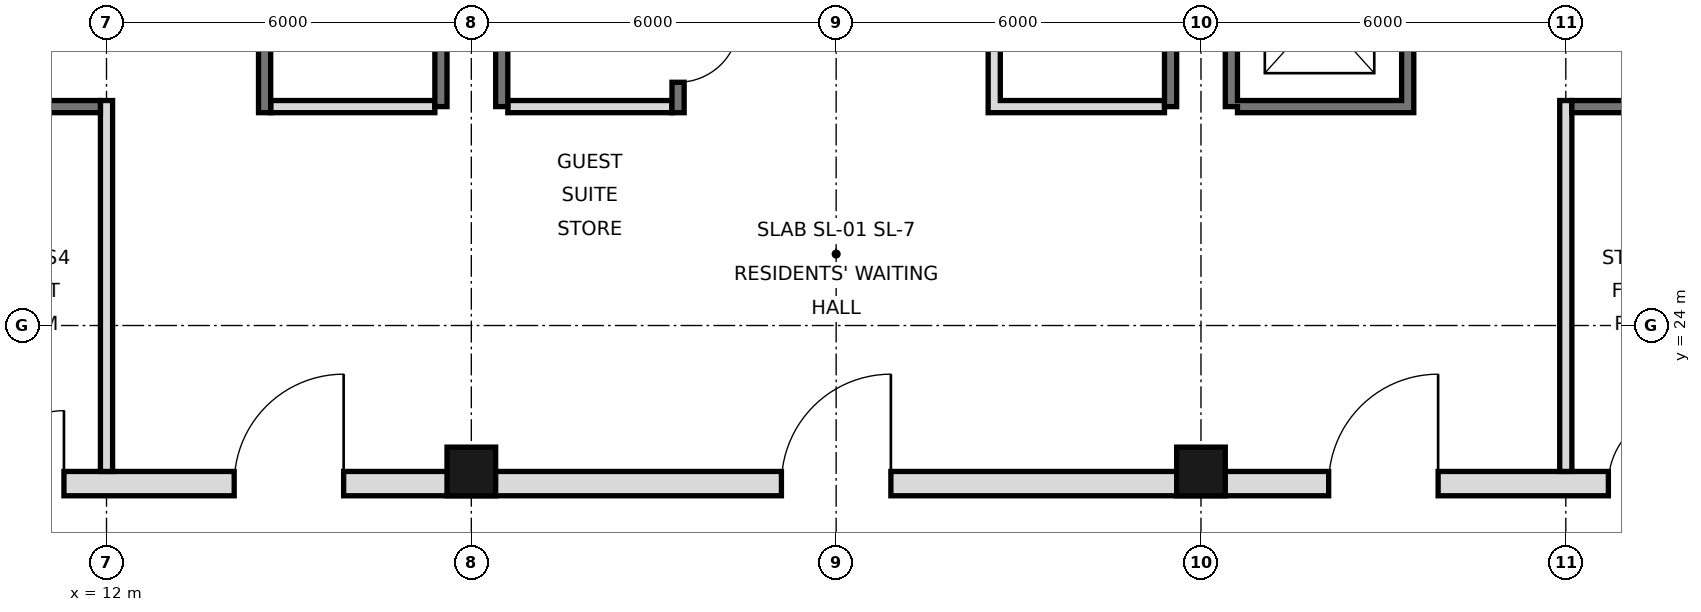
"""IFC4 building model, lengths in metres.
Left out: names, types, materials, properties, quantities, classifications, styles, units other than length and angle.
Written with IfcOpenShell. Run it as: python <this file> out.ifc"""

import sys

from ifc_helpers import new_model, si_unit, direction, frame, frame_2d, origin, origin_2d, place, context, subcontext, project, spatial, rectangle, hollow_rectangle, extrude, element, fill, save


model = new_model("IFC4")
c1 = context("Model", 3, precision=1e-05, world=origin(), true_north=direction((0.0, 1.0)))
c2 = subcontext(c1, "Body", "Model", "MODEL_VIEW")
j1 = project(units=[si_unit("LENGTHUNIT", "METRE"), si_unit("PLANEANGLEUNIT", "RADIAN")], contexts=[c1])
p1 = place(None, origin())
s1 = spatial("IfcSite", under=j1, at=p1, CompositionType="ELEMENT")
p2 = place(p1, origin())
s2 = spatial("IfcBuilding", under=s1, at=p2, CompositionType="ELEMENT")
p3 = place(p2, frame((0.0, 0.0, 222.6)))
s3 = spatial("IfcBuildingStorey", under=s2, at=p3, CompositionType="ELEMENT", Elevation=222.6)
for number, where, z_axis, x_axis in (
    (1, (18.0, 21.6, 0.0), (0.0, 0.0, 1.0), (1.0, 0.0, 0.0)),
    (2, (30.0, 21.6, 0.0), (0.0, 0.0, 1.0), (1.0, 0.0, 0.0)),
):
    element("IfcColumn", number, at=place(p3, frame(where, z_axis=z_axis, x_axis=x_axis)), inside=s3, PredefinedType="COLUMN", context=c2, shape_type="SweptSolid", body=[
        extrude(hollow_rectangle(XDim=0.8, YDim=0.8, WallThickness=0.04, at=origin_2d()), origin(), (0.0, 0.0, 1.0), 3.6),
    ])
for number, where, z_axis, x_axis in (
    (3, (17.5, 27.6, 0.0), (0.0, 0.0, 1.0), (0.0, 1.0, 0.0)),
    (4, (18.5, 27.6, 0.0), (0.0, 0.0, 1.0), (0.0, 1.0, 0.0)),
    (5, (29.5, 27.6, 0.0), (0.0, 0.0, 1.0), (0.0, 1.0, 0.0)),
    (6, (30.5, 27.6, 0.0), (0.0, 0.0, 1.0), (0.0, 1.0, 0.0)),
):
    element("IfcWall", number, at=place(p3, frame(where, z_axis=z_axis, x_axis=x_axis)), inside=s3, PredefinedType="SOLIDWALL", context=c2, shape_type="SweptSolid", body=[
        extrude(rectangle(XDim=17.5, YDim=0.2, at=frame_2d((8.75, 0.0))), origin(), (0.0, 0.0, 1.0), 3.42),
    ])
p4 = place(p3, frame((5.6, 21.4, 0.0), z_axis=(0.0, 0.0, 1.0), x_axis=(1.0, 0.0, 0.0)))
e7 = element("IfcWall", 7, at=p4, inside=s3, PredefinedType="SOLIDWALL", context=c2, shape_type="SweptSolid", body=[
    extrude(rectangle(XDim=36.8, YDim=0.4, at=frame_2d((18.4, 0.0))), origin(), (0.0, 0.0, 1.0), 3.42),
])
p5 = place(p4, frame((8.5, 0.0, 0.0)))
e8 = element("IfcOpeningElement", 8, at=p5, cuts=e7, PredefinedType="OPENING", context=c2, shape_type="SweptSolid", body=[
    extrude(rectangle(XDim=1.8, YDim=2.1, at=frame_2d((0.9, 1.05))), frame((0.0, 0.21, 0.0), z_axis=(0.0, -1.0, 0.0), x_axis=(1.0, 0.0, 0.0)), (0.0, 0.0, 1.0), 0.42),
])
p6 = place(p4, frame((17.5, 0.0, 0.0)))
e9 = element("IfcOpeningElement", 9, at=p6, cuts=e7, PredefinedType="OPENING", context=c2, shape_type="SweptSolid", body=[
    extrude(rectangle(XDim=1.8, YDim=2.1, at=frame_2d((0.9, 1.05))), frame((0.0, 0.21, 0.0), z_axis=(0.0, -1.0, 0.0), x_axis=(1.0, 0.0, 0.0)), (0.0, 0.0, 1.0), 0.42),
])
p7 = place(p4, frame((26.5, 0.0, 0.0)))
e10 = element("IfcOpeningElement", 10, at=p7, cuts=e7, PredefinedType="OPENING", context=c2, shape_type="SweptSolid", body=[
    extrude(rectangle(XDim=1.8, YDim=2.1, at=frame_2d((0.9, 1.05))), frame((0.0, 0.21, 0.0), z_axis=(0.0, -1.0, 0.0), x_axis=(1.0, 0.0, 0.0)), (0.0, 0.0, 1.0), 0.42),
])
p8 = place(p4, frame((4.5, 0.0, 0.0)))
e11 = element("IfcOpeningElement", 11, at=p8, cuts=e7, PredefinedType="OPENING", context=c2, shape_type="SweptSolid", body=[
    extrude(rectangle(XDim=1.2, YDim=2.1, at=frame_2d((0.6, 1.05))), frame((0.0, 0.21, 0.0), z_axis=(0.0, -1.0, 0.0), x_axis=(1.0, 0.0, 0.0)), (0.0, 0.0, 1.0), 0.42),
])
p9 = place(p4, frame((31.1, 0.0, 0.0)))
e12 = element("IfcOpeningElement", 12, at=p9, cuts=e7, PredefinedType="OPENING", context=c2, shape_type="SweptSolid", body=[
    extrude(rectangle(XDim=1.2, YDim=2.1, at=frame_2d((0.6, 1.05))), frame((0.0, 0.21, 0.0), z_axis=(0.0, -1.0, 0.0), x_axis=(1.0, 0.0, 0.0)), (0.0, 0.0, 1.0), 0.42),
])
p10 = place(p3, frame((12.0, 21.6, 0.0), z_axis=(0.0, 0.0, 1.0), x_axis=(0.0, 1.0, 0.0)))
e13 = element("IfcWall", 13, at=p10, inside=s3, PredefinedType="PARTITIONING", context=c2, shape_type="SweptSolid", body=[
    extrude(rectangle(XDim=6.1, YDim=0.2, at=frame_2d((3.05, 0.0))), origin(), (0.0, 0.0, 1.0), 3.42),
])
p11 = place(p3, frame((14.6, 27.5, 0.0), z_axis=(0.0, 0.0, 1.0), x_axis=(0.0, 1.0, 0.0)))
e14 = element("IfcWall", 14, at=p11, inside=s3, PredefinedType="SOLIDWALL", context=c2, shape_type="SweptSolid", body=[
    extrude(rectangle(XDim=17.5, YDim=0.2, at=frame_2d((8.75, 0.0))), origin(), (0.0, 0.0, 1.0), 3.42),
])
p12 = place(p11, frame((15.4, 0.0, 0.0)))
e15 = element("IfcOpeningElement", 15, at=p12, cuts=e14, PredefinedType="OPENING", context=c2, shape_type="SweptSolid", body=[
    extrude(rectangle(XDim=1.1, YDim=2.1, at=frame_2d((0.55, 1.05))), frame((0.0, 0.11, 0.0), z_axis=(0.0, -1.0, 0.0), x_axis=(1.0, 0.0, 0.0)), (0.0, 0.0, 1.0), 0.22),
])
p13 = place(p11, frame((2.7, 0.0, 0.0)))
e16 = element("IfcOpeningElement", 16, at=p13, cuts=e14, PredefinedType="OPENING", context=c2, shape_type="SweptSolid", body=[
    extrude(rectangle(XDim=1.0, YDim=2.1, at=frame_2d((0.5, 1.05))), frame((0.0, 0.11, 0.0), z_axis=(0.0, -1.0, 0.0), x_axis=(1.0, 0.0, 0.0)), (0.0, 0.0, 1.0), 0.22),
])
p14 = place(p11, frame((9.9, 0.0, 0.0)))
e17 = element("IfcOpeningElement", 17, at=p14, cuts=e14, PredefinedType="OPENING", context=c2, shape_type="SweptSolid", body=[
    extrude(rectangle(XDim=0.9, YDim=2.1, at=frame_2d((0.45, 1.05))), frame((0.0, 0.11, 0.0), z_axis=(0.0, -1.0, 0.0), x_axis=(1.0, 0.0, 0.0)), (0.0, 0.0, 1.0), 0.22),
])
p15 = place(p3, frame((21.4, 27.5, 0.0), z_axis=(0.0, 0.0, 1.0), x_axis=(0.0, 1.0, 0.0)))
e18 = element("IfcWall", 18, at=p15, inside=s3, PredefinedType="SOLIDWALL", context=c2, shape_type="SweptSolid", body=[
    extrude(rectangle(XDim=17.5, YDim=0.2, at=frame_2d((8.75, 0.0))), origin(), (0.0, 0.0, 1.0), 3.42),
])
p16 = place(p15, frame((0.5, 0.0, 0.0)))
e19 = element("IfcOpeningElement", 19, at=p16, cuts=e18, PredefinedType="OPENING", context=c2, shape_type="SweptSolid", body=[
    extrude(rectangle(XDim=1.0, YDim=2.1, at=frame_2d((0.5, 1.05))), frame((0.0, 0.11, 0.0), z_axis=(0.0, -1.0, 0.0), x_axis=(1.0, 0.0, 0.0)), (0.0, 0.0, 1.0), 0.22),
])
p17 = place(p15, frame((3.6, 0.0, 0.0)))
e20 = element("IfcOpeningElement", 20, at=p17, cuts=e18, PredefinedType="OPENING", context=c2, shape_type="SweptSolid", body=[
    extrude(rectangle(XDim=1.0, YDim=2.1, at=frame_2d((0.5, 1.05))), frame((0.0, 0.11, 0.0), z_axis=(0.0, -1.0, 0.0), x_axis=(1.0, 0.0, 0.0)), (0.0, 0.0, 1.0), 0.22),
])
p18 = place(p15, frame((16.2, 0.0, 0.0)))
e21 = element("IfcOpeningElement", 21, at=p18, cuts=e18, PredefinedType="OPENING", context=c2, shape_type="SweptSolid", body=[
    extrude(rectangle(XDim=1.0, YDim=2.1, at=frame_2d((0.5, 1.05))), frame((0.0, 0.11, 0.0), z_axis=(0.0, -1.0, 0.0), x_axis=(1.0, 0.0, 0.0)), (0.0, 0.0, 1.0), 0.22),
])
p19 = place(p15, frame((7.4, 0.0, 0.0)))
e22 = element("IfcOpeningElement", 22, at=p19, cuts=e18, PredefinedType="OPENING", context=c2, shape_type="SweptSolid", body=[
    extrude(rectangle(XDim=0.9, YDim=2.1, at=frame_2d((0.45, 1.05))), frame((0.0, 0.11, 0.0), z_axis=(0.0, -1.0, 0.0), x_axis=(1.0, 0.0, 0.0)), (0.0, 0.0, 1.0), 0.22),
])
p20 = place(p3, frame((26.6, 27.5, 0.0), z_axis=(0.0, 0.0, 1.0), x_axis=(0.0, 1.0, 0.0)))
e23 = element("IfcWall", 23, at=p20, inside=s3, PredefinedType="SOLIDWALL", context=c2, shape_type="SweptSolid", body=[
    extrude(rectangle(XDim=17.5, YDim=0.2, at=frame_2d((8.75, 0.0))), origin(), (0.0, 0.0, 1.0), 3.42),
])
p21 = place(p20, frame((4.3, 0.0, 0.0)))
e24 = element("IfcOpeningElement", 24, at=p21, cuts=e23, PredefinedType="OPENING", context=c2, shape_type="SweptSolid", body=[
    extrude(rectangle(XDim=0.9, YDim=2.1, at=frame_2d((0.45, 1.05))), frame((0.0, 0.11, 0.0), z_axis=(0.0, -1.0, 0.0), x_axis=(1.0, 0.0, 0.0)), (0.0, 0.0, 1.0), 0.22),
])
p22 = place(p20, frame((10.35, 0.0, 0.0)))
e25 = element("IfcOpeningElement", 25, at=p22, cuts=e23, PredefinedType="OPENING", context=c2, shape_type="SweptSolid", body=[
    extrude(rectangle(XDim=1.0, YDim=2.1, at=frame_2d((0.5, 1.05))), frame((0.0, 0.11, 0.0), z_axis=(0.0, -1.0, 0.0), x_axis=(1.0, 0.0, 0.0)), (0.0, 0.0, 1.0), 0.22),
])
p23 = place(p20, frame((14.575, 0.0, 0.0)))
e26 = element("IfcOpeningElement", 26, at=p23, cuts=e23, PredefinedType="OPENING", context=c2, shape_type="SweptSolid", body=[
    extrude(rectangle(XDim=1.0, YDim=2.1, at=frame_2d((0.5, 1.05))), frame((0.0, 0.11, 0.0), z_axis=(0.0, -1.0, 0.0), x_axis=(1.0, 0.0, 0.0)), (0.0, 0.0, 1.0), 0.22),
])
p24 = place(p3, frame((33.4, 27.5, 0.0), z_axis=(0.0, 0.0, 1.0), x_axis=(0.0, 1.0, 0.0)))
e27 = element("IfcWall", 27, at=p24, inside=s3, PredefinedType="SOLIDWALL", context=c2, shape_type="SweptSolid", body=[
    extrude(rectangle(XDim=17.5, YDim=0.2, at=frame_2d((8.75, 0.0))), origin(), (0.0, 0.0, 1.0), 3.42),
])
p25 = place(p24, frame((1.1, 0.0, 0.0)))
e28 = element("IfcOpeningElement", 28, at=p25, cuts=e27, PredefinedType="OPENING", context=c2, shape_type="SweptSolid", body=[
    extrude(rectangle(XDim=1.1, YDim=2.1, at=frame_2d((0.55, 1.05))), frame((0.0, 0.11, 0.0), z_axis=(0.0, -1.0, 0.0), x_axis=(1.0, 0.0, 0.0)), (0.0, 0.0, 1.0), 0.22),
])
p26 = place(p24, frame((4.2, 0.0, 0.0)))
e29 = element("IfcOpeningElement", 29, at=p26, cuts=e27, PredefinedType="OPENING", context=c2, shape_type="SweptSolid", body=[
    extrude(rectangle(XDim=1.1, YDim=2.1, at=frame_2d((0.55, 1.05))), frame((0.0, 0.11, 0.0), z_axis=(0.0, -1.0, 0.0), x_axis=(1.0, 0.0, 0.0)), (0.0, 0.0, 1.0), 0.22),
])
p27 = place(p24, frame((15.4, 0.0, 0.0)))
e30 = element("IfcOpeningElement", 30, at=p27, cuts=e27, PredefinedType="OPENING", context=c2, shape_type="SweptSolid", body=[
    extrude(rectangle(XDim=1.1, YDim=2.1, at=frame_2d((0.55, 1.05))), frame((0.0, 0.11, 0.0), z_axis=(0.0, -1.0, 0.0), x_axis=(1.0, 0.0, 0.0)), (0.0, 0.0, 1.0), 0.22),
])
p28 = place(p24, frame((9.9, 0.0, 0.0)))
e31 = element("IfcOpeningElement", 31, at=p28, cuts=e27, PredefinedType="OPENING", context=c2, shape_type="SweptSolid", body=[
    extrude(rectangle(XDim=0.9, YDim=2.1, at=frame_2d((0.45, 1.05))), frame((0.0, 0.11, 0.0), z_axis=(0.0, -1.0, 0.0), x_axis=(1.0, 0.0, 0.0)), (0.0, 0.0, 1.0), 0.22),
])
p29 = place(p3, frame((36.0, 21.6, 0.0), z_axis=(0.0, 0.0, 1.0), x_axis=(0.0, 1.0, 0.0)))
e32 = element("IfcWall", 32, at=p29, inside=s3, PredefinedType="PARTITIONING", context=c2, shape_type="SweptSolid", body=[
    extrude(rectangle(XDim=6.1, YDim=0.2, at=frame_2d((3.05, 0.0))), origin(), (0.0, 0.0, 1.0), 3.42),
])
for number, where, z_axis, x_axis in (
    (33, (14.7, 27.6, 0.0), (0.0, 0.0, 1.0), (1.0, 0.0, 0.0)),
    (34, (18.6, 27.6, 0.0), (0.0, 0.0, 1.0), (1.0, 0.0, 0.0)),
):
    element("IfcWall", number, at=place(p3, frame(where, z_axis=z_axis, x_axis=x_axis)), inside=s3, PredefinedType="PARTITIONING", context=c2, shape_type="SweptSolid", body=[
        extrude(rectangle(XDim=2.7, YDim=0.2, at=frame_2d((1.35, 0.0))), origin(), (0.0, 0.0, 1.0), 3.42),
    ])
for number, where, z_axis, x_axis in (
    (35, (26.7, 27.6, 0.0), (0.0, 0.0, 1.0), (1.0, 0.0, 0.0)),
    (36, (30.6, 27.6, 0.0), (0.0, 0.0, 1.0), (1.0, 0.0, 0.0)),
):
    element("IfcWall", number, at=place(p3, frame(where, z_axis=z_axis, x_axis=x_axis)), inside=s3, PredefinedType="SOLIDWALL", context=c2, shape_type="SweptSolid", body=[
        extrude(rectangle(XDim=2.7, YDim=0.2, at=frame_2d((1.35, 0.0))), origin(), (0.0, 0.0, 1.0), 3.42),
    ])
for number, where, z_axis, x_axis in (
    (37, (36.1, 27.6, 0.0), (0.0, 0.0, 1.0), (1.0, 0.0, 0.0)),
    (38, (6.6, 27.6, 0.0), (0.0, 0.0, 1.0), (1.0, 0.0, 0.0)),
):
    element("IfcWall", number, at=place(p3, frame(where, z_axis=z_axis, x_axis=x_axis)), inside=s3, PredefinedType="SOLIDWALL", context=c2, shape_type="SweptSolid", body=[
        extrude(rectangle(XDim=5.3, YDim=0.2, at=frame_2d((2.65, 0.0))), origin(), (0.0, 0.0, 1.0), 3.42),
    ])
p30 = place(p5, frame((1.8, 0.0, 0.0), z_axis=(0.0, 0.0, 1.0), x_axis=(-1.0, 0.0, 0.0)))
e39 = element("IfcDoor", 39, at=p30, inside=s3, OperationType="SINGLE_SWING_LEFT", PredefinedType="DOOR", context=c2, shape_type="SweptSolid", body=[
    extrude(rectangle(XDim=1.8, YDim=2.1, at=frame_2d((0.9, 1.05))), frame((0.0, 0.025, 0.0), z_axis=(0.0, -1.0, 0.0), x_axis=(1.0, 0.0, 0.0)), (0.0, 0.0, 1.0), 0.05),
])
fill(e8, e39)
p31 = place(p6, frame((1.8, 0.0, 0.0), z_axis=(0.0, 0.0, 1.0), x_axis=(-1.0, 0.0, 0.0)))
e40 = element("IfcDoor", 40, at=p31, inside=s3, OperationType="SINGLE_SWING_LEFT", PredefinedType="DOOR", context=c2, shape_type="SweptSolid", body=[
    extrude(rectangle(XDim=1.8, YDim=2.1, at=frame_2d((0.9, 1.05))), frame((0.0, 0.025, 0.0), z_axis=(0.0, -1.0, 0.0), x_axis=(1.0, 0.0, 0.0)), (0.0, 0.0, 1.0), 0.05),
])
fill(e9, e40)
p32 = place(p7, frame((1.8, 0.0, 0.0), z_axis=(0.0, 0.0, 1.0), x_axis=(-1.0, 0.0, 0.0)))
e41 = element("IfcDoor", 41, at=p32, inside=s3, OperationType="SINGLE_SWING_LEFT", PredefinedType="DOOR", context=c2, shape_type="SweptSolid", body=[
    extrude(rectangle(XDim=1.8, YDim=2.1, at=frame_2d((0.9, 1.05))), frame((0.0, 0.025, 0.0), z_axis=(0.0, -1.0, 0.0), x_axis=(1.0, 0.0, 0.0)), (0.0, 0.0, 1.0), 0.05),
])
fill(e10, e41)
p33 = place(p8, frame((1.2, 0.0, 0.0), z_axis=(0.0, 0.0, 1.0), x_axis=(-1.0, 0.0, 0.0)))
e42 = element("IfcDoor", 42, at=p33, inside=s3, OperationType="SINGLE_SWING_LEFT", PredefinedType="DOOR", context=c2, shape_type="SweptSolid", body=[
    extrude(rectangle(XDim=1.2, YDim=2.1, at=frame_2d((0.6, 1.05))), frame((0.0, 0.025, 0.0), z_axis=(0.0, -1.0, 0.0), x_axis=(1.0, 0.0, 0.0)), (0.0, 0.0, 1.0), 0.05),
])
fill(e11, e42)
p34 = place(p9, frame((1.2, 0.0, 0.0), z_axis=(0.0, 0.0, 1.0), x_axis=(-1.0, 0.0, 0.0)))
e43 = element("IfcDoor", 43, at=p34, inside=s3, OperationType="SINGLE_SWING_LEFT", PredefinedType="DOOR", context=c2, shape_type="SweptSolid", body=[
    extrude(rectangle(XDim=1.2, YDim=2.1, at=frame_2d((0.6, 1.05))), frame((0.0, 0.025, 0.0), z_axis=(0.0, -1.0, 0.0), x_axis=(1.0, 0.0, 0.0)), (0.0, 0.0, 1.0), 0.05),
])
fill(e12, e43)
p35 = place(p16, origin())
e44 = element("IfcDoor", 44, at=p35, inside=s3, OperationType="SINGLE_SWING_RIGHT", PredefinedType="DOOR", context=c2, shape_type="SweptSolid", body=[
    extrude(rectangle(XDim=1.0, YDim=2.1, at=frame_2d((0.5, 1.05))), frame((0.0, 0.025, 0.0), z_axis=(0.0, -1.0, 0.0), x_axis=(1.0, 0.0, 0.0)), (0.0, 0.0, 1.0), 0.05),
])
fill(e19, e44)
save(model, sys.argv[1])
